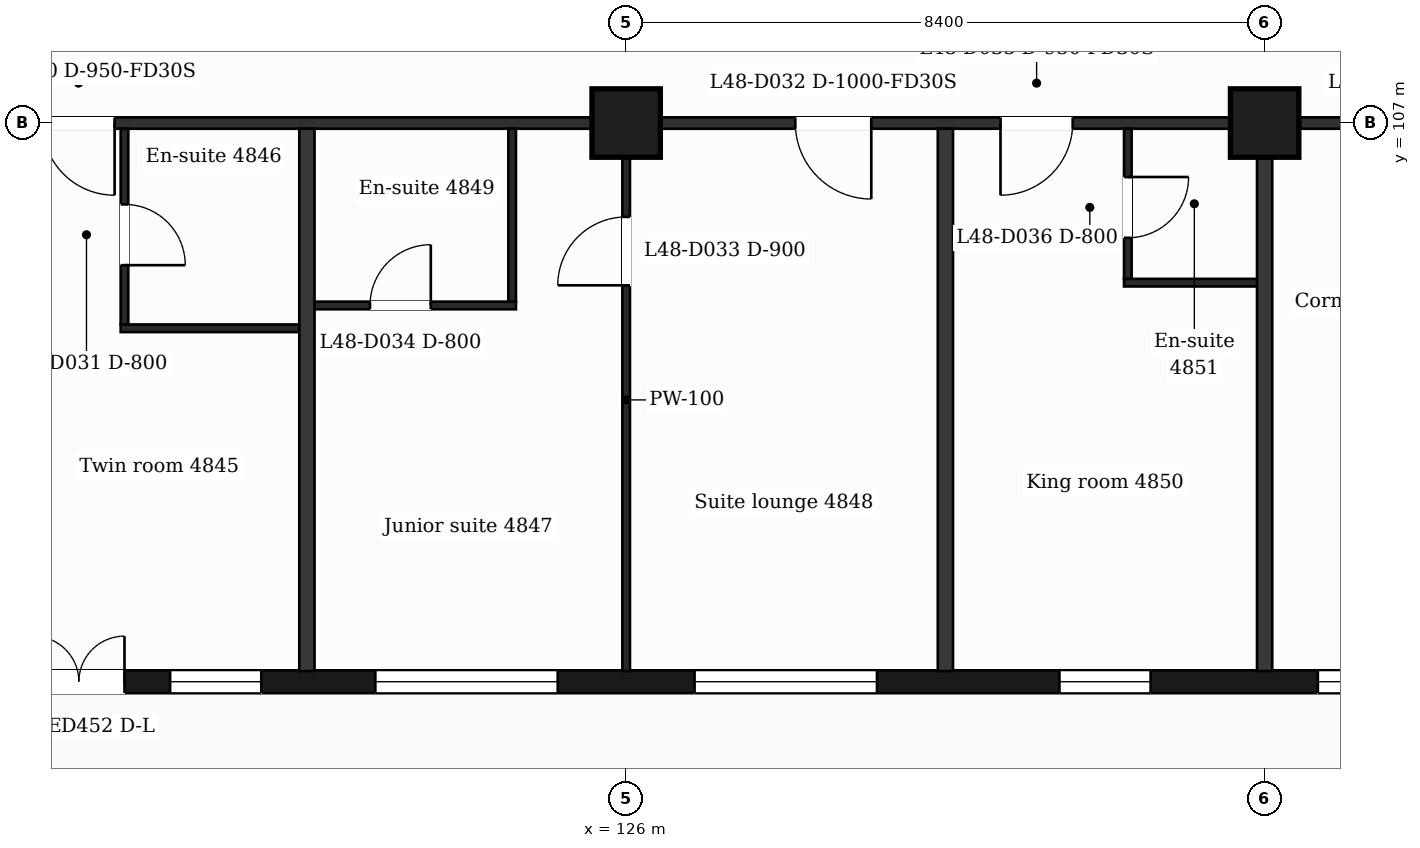
"""IFC4 building model, lengths in metres.
Left out: names, types, materials, properties, quantities, classifications, styles, units other than length and angle.
Written with IfcOpenShell. Run it as: python <this file> out.ifc"""

import sys

from ifc_helpers import new_model, si_unit, direction, frame, frame_2d, origin, origin_2d, place, context, subcontext, project, spatial, rectangle, extrude, element, fill, save


model = new_model("IFC4")
c1 = context("Model", 3, precision=1e-05, world=origin(), true_north=direction((0.0, 1.0)))
c2 = subcontext(c1, "Body", "Model", "MODEL_VIEW")
j1 = project(units=[si_unit("LENGTHUNIT", "METRE"), si_unit("PLANEANGLEUNIT", "RADIAN")], contexts=[c1])
p1 = place(None, origin())
s1 = spatial("IfcSite", under=j1, at=p1, CompositionType="ELEMENT")
p2 = place(p1, origin())
s2 = spatial("IfcBuilding", under=s1, at=p2, CompositionType="ELEMENT")
p3 = place(p2, frame((0.0, 0.0, 202.2)))
s3 = spatial("IfcBuildingStorey", under=s2, at=p3, CompositionType="ELEMENT", Elevation=202.2)
for number, where, z_axis, x_axis in (
    (1, (126.0, 107.0, 0.0), (0.0, 0.0, 1.0), (1.0, 0.0, 0.0)),
    (2, (134.4, 107.0, 0.0), (0.0, 0.0, 1.0), (1.0, 0.0, 0.0)),
):
    element("IfcColumn", number, at=place(p3, frame(where, z_axis=z_axis, x_axis=x_axis)), inside=s3, PredefinedType="COLUMN", context=c2, shape_type="SweptSolid", body=[
        extrude(rectangle(XDim=0.9, YDim=0.9, at=origin_2d()), origin(), (0.0, 0.0, 1.0), 3.7),
    ])
p4 = place(p3, frame((89.85, 99.65, 0.0), z_axis=(0.0, 0.0, 1.0), x_axis=(1.0, 0.0, 0.0)))
e3 = element("IfcWall", 3, at=p4, inside=s3, PredefinedType="SOLIDWALL", context=c2, shape_type="SweptSolid", body=[
    extrude(rectangle(XDim=47.25, YDim=0.3, at=frame_2d((23.625, 0.0))), origin(), (0.0, 0.0, 1.0), 3.38),
])
p5 = place(p4, frame((0.725, 0.0, 0.9)))
e4 = element("IfcOpeningElement", 4, at=p5, cuts=e3, PredefinedType="OPENING", context=c2, shape_type="SweptSolid", body=[
    extrude(rectangle(XDim=1.2, YDim=2.1, at=frame_2d((0.6, 1.05))), frame((0.0, 0.16, 0.0), z_axis=(0.0, -1.0, 0.0), x_axis=(1.0, 0.0, 0.0)), (0.0, 0.0, 1.0), 0.32),
])
p6 = place(p4, frame((3.45, 0.0, 0.9)))
e5 = element("IfcOpeningElement", 5, at=p6, cuts=e3, PredefinedType="OPENING", context=c2, shape_type="SweptSolid", body=[
    extrude(rectangle(XDim=2.4, YDim=2.1, at=frame_2d((1.2, 1.05))), frame((0.0, 0.16, 0.0), z_axis=(0.0, -1.0, 0.0), x_axis=(1.0, 0.0, 0.0)), (0.0, 0.0, 1.0), 0.32),
])
p7 = place(p4, frame((7.65, 0.0, 0.9)))
e6 = element("IfcOpeningElement", 6, at=p7, cuts=e3, PredefinedType="OPENING", context=c2, shape_type="SweptSolid", body=[
    extrude(rectangle(XDim=2.4, YDim=2.1, at=frame_2d((1.2, 1.05))), frame((0.0, 0.16, 0.0), z_axis=(0.0, -1.0, 0.0), x_axis=(1.0, 0.0, 0.0)), (0.0, 0.0, 1.0), 0.32),
])
p8 = place(p4, frame((12.45, 0.0, 0.9)))
e7 = element("IfcOpeningElement", 7, at=p8, cuts=e3, PredefinedType="OPENING", context=c2, shape_type="SweptSolid", body=[
    extrude(rectangle(XDim=1.2, YDim=2.1, at=frame_2d((0.6, 1.05))), frame((0.0, 0.16, 0.0), z_axis=(0.0, -1.0, 0.0), x_axis=(1.0, 0.0, 0.0)), (0.0, 0.0, 1.0), 0.32),
])
p9 = place(p4, frame((16.65, 0.0, 0.9)))
e8 = element("IfcOpeningElement", 8, at=p9, cuts=e3, PredefinedType="OPENING", context=c2, shape_type="SweptSolid", body=[
    extrude(rectangle(XDim=1.2, YDim=2.1, at=frame_2d((0.6, 1.05))), frame((0.0, 0.16, 0.0), z_axis=(0.0, -1.0, 0.0), x_axis=(1.0, 0.0, 0.0)), (0.0, 0.0, 1.0), 0.32),
])
p10 = place(p4, frame((19.95, 0.0, 0.0)))
e9 = element("IfcOpeningElement", 9, at=p10, cuts=e3, PredefinedType="OPENING", context=c2, shape_type="SweptSolid", body=[
    extrude(rectangle(XDim=1.2, YDim=2.4, at=frame_2d((0.6, 1.2))), frame((0.0, 0.16, 0.0), z_axis=(0.0, -1.0, 0.0), x_axis=(1.0, 0.0, 0.0)), (0.0, 0.0, 1.0), 0.32),
])
p11 = place(p4, frame((21.75, 0.0, 0.9)))
e10 = element("IfcOpeningElement", 10, at=p11, cuts=e3, PredefinedType="OPENING", context=c2, shape_type="SweptSolid", body=[
    extrude(rectangle(XDim=1.2, YDim=2.1, at=frame_2d((0.6, 1.05))), frame((0.0, 0.16, 0.0), z_axis=(0.0, -1.0, 0.0), x_axis=(1.0, 0.0, 0.0)), (0.0, 0.0, 1.0), 0.32),
])
p12 = place(p4, frame((24.45, 0.0, 0.9)))
e11 = element("IfcOpeningElement", 11, at=p12, cuts=e3, PredefinedType="OPENING", context=c2, shape_type="SweptSolid", body=[
    extrude(rectangle(XDim=2.4, YDim=2.1, at=frame_2d((1.2, 1.05))), frame((0.0, 0.16, 0.0), z_axis=(0.0, -1.0, 0.0), x_axis=(1.0, 0.0, 0.0)), (0.0, 0.0, 1.0), 0.32),
])
p13 = place(p4, frame((28.35, 0.0, 0.0)))
e12 = element("IfcOpeningElement", 12, at=p13, cuts=e3, PredefinedType="OPENING", context=c2, shape_type="SweptSolid", body=[
    extrude(rectangle(XDim=1.2, YDim=2.4, at=frame_2d((0.6, 1.2))), frame((0.0, 0.16, 0.0), z_axis=(0.0, -1.0, 0.0), x_axis=(1.0, 0.0, 0.0)), (0.0, 0.0, 1.0), 0.32),
])
p14 = place(p4, frame((30.15, 0.0, 0.9)))
e13 = element("IfcOpeningElement", 13, at=p14, cuts=e3, PredefinedType="OPENING", context=c2, shape_type="SweptSolid", body=[
    extrude(rectangle(XDim=1.2, YDim=2.1, at=frame_2d((0.6, 1.05))), frame((0.0, 0.16, 0.0), z_axis=(0.0, -1.0, 0.0), x_axis=(1.0, 0.0, 0.0)), (0.0, 0.0, 1.0), 0.32),
])
p15 = place(p4, frame((32.85, 0.0, 0.9)))
e14 = element("IfcOpeningElement", 14, at=p15, cuts=e3, PredefinedType="OPENING", context=c2, shape_type="SweptSolid", body=[
    extrude(rectangle(XDim=2.4, YDim=2.1, at=frame_2d((1.2, 1.05))), frame((0.0, 0.16, 0.0), z_axis=(0.0, -1.0, 0.0), x_axis=(1.0, 0.0, 0.0)), (0.0, 0.0, 1.0), 0.32),
])
p16 = place(p4, frame((37.05, 0.0, 0.9)))
e15 = element("IfcOpeningElement", 15, at=p16, cuts=e3, PredefinedType="OPENING", context=c2, shape_type="SweptSolid", body=[
    extrude(rectangle(XDim=2.4, YDim=2.1, at=frame_2d((1.2, 1.05))), frame((0.0, 0.16, 0.0), z_axis=(0.0, -1.0, 0.0), x_axis=(1.0, 0.0, 0.0)), (0.0, 0.0, 1.0), 0.32),
])
p17 = place(p4, frame((41.85, 0.0, 0.9)))
e16 = element("IfcOpeningElement", 16, at=p17, cuts=e3, PredefinedType="OPENING", context=c2, shape_type="SweptSolid", body=[
    extrude(rectangle(XDim=1.2, YDim=2.1, at=frame_2d((0.6, 1.05))), frame((0.0, 0.16, 0.0), z_axis=(0.0, -1.0, 0.0), x_axis=(1.0, 0.0, 0.0)), (0.0, 0.0, 1.0), 0.32),
])
p18 = place(p4, frame((45.25, 0.0, 0.9)))
e17 = element("IfcOpeningElement", 17, at=p18, cuts=e3, PredefinedType="OPENING", context=c2, shape_type="SweptSolid", body=[
    extrude(rectangle(XDim=1.2, YDim=2.1, at=frame_2d((0.6, 1.05))), frame((0.0, 0.16, 0.0), z_axis=(0.0, -1.0, 0.0), x_axis=(1.0, 0.0, 0.0)), (0.0, 0.0, 1.0), 0.32),
])
p19 = place(p3, frame((119.35, 104.3, 0.0), z_axis=(0.0, 0.0, 1.0), x_axis=(1.0, 0.0, 0.0)))
e18 = element("IfcWall", 18, at=p19, inside=s3, PredefinedType="PARTITIONING", context=c2, shape_type="SweptSolid", body=[
    extrude(rectangle(XDim=2.45, YDim=0.1, at=frame_2d((1.225, 0.0))), origin(), (0.0, 0.0, 1.0), 3.38),
])
p20 = place(p3, frame((121.8, 104.6, 0.0), z_axis=(0.0, 0.0, 1.0), x_axis=(1.0, 0.0, 0.0)))
e19 = element("IfcWall", 19, at=p20, inside=s3, PredefinedType="PARTITIONING", context=c2, shape_type="SweptSolid", body=[
    extrude(rectangle(XDim=2.75, YDim=0.1, at=frame_2d((1.375, 0.0))), origin(), (0.0, 0.0, 1.0), 3.38),
])
p21 = place(p20, frame((0.83, 0.0, 0.0)))
e20 = element("IfcOpeningElement", 20, at=p21, cuts=e19, PredefinedType="OPENING", context=c2, shape_type="SweptSolid", body=[
    extrude(rectangle(XDim=0.8, YDim=2.1, at=frame_2d((0.4, 1.05))), frame((0.0, 0.06, 0.0), z_axis=(0.0, -1.0, 0.0), x_axis=(1.0, 0.0, 0.0)), (0.0, 0.0, 1.0), 0.12),
])
p22 = place(p3, frame((132.55, 104.9, 0.0), z_axis=(0.0, 0.0, 1.0), x_axis=(1.0, 0.0, 0.0)))
e21 = element("IfcWall", 21, at=p22, inside=s3, PredefinedType="PARTITIONING", context=c2, shape_type="SweptSolid", body=[
    extrude(rectangle(XDim=1.85, YDim=0.1, at=frame_2d((0.925, 0.0))), origin(), (0.0, 0.0, 1.0), 3.38),
])
p23 = place(p3, frame((87.018, 107.0, 0.0), z_axis=(0.0, 0.0, 1.0), x_axis=(1.0, 0.0, 0.0)))
e22 = element("IfcWall", 22, at=p23, inside=s3, PredefinedType="PARTITIONING", context=c2, shape_type="SweptSolid", body=[
    extrude(rectangle(XDim=52.765, YDim=0.15, at=frame_2d((26.382, 0.0))), origin(), (0.0, 0.0, 1.0), 3.38),
])
p24 = place(p23, frame((1.276, 0.0, 0.0)))
e23 = element("IfcOpeningElement", 23, at=p24, cuts=e22, PredefinedType="OPENING", context=c2, shape_type="SweptSolid", body=[
    extrude(rectangle(XDim=0.95, YDim=2.1, at=frame_2d((0.475, 1.05))), frame((0.0, 0.085, 0.0), z_axis=(0.0, -1.0, 0.0), x_axis=(1.0, 0.0, 0.0)), (0.0, 0.0, 1.0), 0.17),
])
p25 = place(p23, frame((6.369, 0.0, 0.0)))
e24 = element("IfcOpeningElement", 24, at=p25, cuts=e22, PredefinedType="OPENING", context=c2, shape_type="SweptSolid", body=[
    extrude(rectangle(XDim=0.95, YDim=2.1, at=frame_2d((0.475, 1.05))), frame((0.0, 0.085, 0.0), z_axis=(0.0, -1.0, 0.0), x_axis=(1.0, 0.0, 0.0)), (0.0, 0.0, 1.0), 0.17),
])
p26 = place(p23, frame((12.112, 0.0, 0.0)))
e25 = element("IfcOpeningElement", 25, at=p26, cuts=e22, PredefinedType="OPENING", context=c2, shape_type="SweptSolid", body=[
    extrude(rectangle(XDim=0.95, YDim=2.1, at=frame_2d((0.475, 1.05))), frame((0.0, 0.085, 0.0), z_axis=(0.0, -1.0, 0.0), x_axis=(1.0, 0.0, 0.0)), (0.0, 0.0, 1.0), 0.17),
])
p27 = place(p23, frame((14.582, 0.0, 0.0)))
e26 = element("IfcOpeningElement", 26, at=p27, cuts=e22, PredefinedType="OPENING", context=c2, shape_type="SweptSolid", body=[
    extrude(rectangle(XDim=0.95, YDim=2.1, at=frame_2d((0.475, 1.05))), frame((0.0, 0.085, 0.0), z_axis=(0.0, -1.0, 0.0), x_axis=(1.0, 0.0, 0.0)), (0.0, 0.0, 1.0), 0.17),
])
p28 = place(p23, frame((20.512, 0.0, 0.0)))
e27 = element("IfcOpeningElement", 27, at=p28, cuts=e22, PredefinedType="OPENING", context=c2, shape_type="SweptSolid", body=[
    extrude(rectangle(XDim=0.95, YDim=2.1, at=frame_2d((0.475, 1.05))), frame((0.0, 0.085, 0.0), z_axis=(0.0, -1.0, 0.0), x_axis=(1.0, 0.0, 0.0)), (0.0, 0.0, 1.0), 0.17),
])
p29 = place(p23, frame((25.157, 0.0, 0.0)))
e28 = element("IfcOpeningElement", 28, at=p29, cuts=e22, PredefinedType="OPENING", context=c2, shape_type="SweptSolid", body=[
    extrude(rectangle(XDim=0.95, YDim=2.1, at=frame_2d((0.475, 1.05))), frame((0.0, 0.085, 0.0), z_axis=(0.0, -1.0, 0.0), x_axis=(1.0, 0.0, 0.0)), (0.0, 0.0, 1.0), 0.17),
])
p30 = place(p23, frame((26.657, 0.0, 0.0)))
e29 = element("IfcOpeningElement", 29, at=p30, cuts=e22, PredefinedType="OPENING", context=c2, shape_type="SweptSolid", body=[
    extrude(rectangle(XDim=0.95, YDim=2.1, at=frame_2d((0.475, 1.05))), frame((0.0, 0.085, 0.0), z_axis=(0.0, -1.0, 0.0), x_axis=(1.0, 0.0, 0.0)), (0.0, 0.0, 1.0), 0.17),
])
p31 = place(p23, frame((31.302, 0.0, 0.0)))
e30 = element("IfcOpeningElement", 30, at=p31, cuts=e22, PredefinedType="OPENING", context=c2, shape_type="SweptSolid", body=[
    extrude(rectangle(XDim=0.95, YDim=2.1, at=frame_2d((0.475, 1.05))), frame((0.0, 0.085, 0.0), z_axis=(0.0, -1.0, 0.0), x_axis=(1.0, 0.0, 0.0)), (0.0, 0.0, 1.0), 0.17),
])
p32 = place(p23, frame((41.207, 0.0, 0.0)))
e31 = element("IfcOpeningElement", 31, at=p32, cuts=e22, PredefinedType="OPENING", context=c2, shape_type="SweptSolid", body=[
    extrude(rectangle(XDim=1.0, YDim=2.1, at=frame_2d((0.5, 1.05))), frame((0.0, 0.085, 0.0), z_axis=(0.0, -1.0, 0.0), x_axis=(1.0, 0.0, 0.0)), (0.0, 0.0, 1.0), 0.17),
])
p33 = place(p23, frame((43.907, 0.0, 0.0)))
e32 = element("IfcOpeningElement", 32, at=p33, cuts=e22, PredefinedType="OPENING", context=c2, shape_type="SweptSolid", body=[
    extrude(rectangle(XDim=0.95, YDim=2.1, at=frame_2d((0.475, 1.05))), frame((0.0, 0.085, 0.0), z_axis=(0.0, -1.0, 0.0), x_axis=(1.0, 0.0, 0.0)), (0.0, 0.0, 1.0), 0.17),
])
p34 = place(p23, frame((49.285, 0.0, 0.0)))
e33 = element("IfcOpeningElement", 33, at=p34, cuts=e22, PredefinedType="OPENING", context=c2, shape_type="SweptSolid", body=[
    extrude(rectangle(XDim=0.95, YDim=2.1, at=frame_2d((0.475, 1.05))), frame((0.0, 0.085, 0.0), z_axis=(0.0, -1.0, 0.0), x_axis=(1.0, 0.0, 0.0)), (0.0, 0.0, 1.0), 0.17),
])
p35 = place(p3, frame((119.4, 104.35, 0.0), z_axis=(0.0, 0.0, 1.0), x_axis=(0.0, 1.0, 0.0)))
e34 = element("IfcWall", 34, at=p35, inside=s3, PredefinedType="PARTITIONING", context=c2, shape_type="SweptSolid", body=[
    extrude(rectangle(XDim=2.575, YDim=0.1, at=frame_2d((1.288, 0.0))), origin(), (0.0, 0.0, 1.0), 3.38),
])
p36 = place(p35, frame((0.78, 0.0, 0.0)))
e35 = element("IfcOpeningElement", 35, at=p36, cuts=e34, PredefinedType="OPENING", context=c2, shape_type="SweptSolid", body=[
    extrude(rectangle(XDim=0.8, YDim=2.1, at=frame_2d((0.4, 1.05))), frame((0.0, 0.06, 0.0), z_axis=(0.0, -1.0, 0.0), x_axis=(1.0, 0.0, 0.0)), (0.0, 0.0, 1.0), 0.12),
])
p37 = place(p3, frame((121.8, 99.79, 0.0), z_axis=(0.0, 0.0, 1.0), x_axis=(0.0, 1.0, 0.0)))
e36 = element("IfcWall", 36, at=p37, inside=s3, PredefinedType="PARTITIONING", context=c2, shape_type="SweptSolid", body=[
    extrude(rectangle(XDim=7.135, YDim=0.2, at=frame_2d((3.567, 0.0))), origin(), (0.0, 0.0, 1.0), 3.38),
])
p38 = place(p3, frame((124.5, 104.65, 0.0), z_axis=(0.0, 0.0, 1.0), x_axis=(0.0, 1.0, 0.0)))
e37 = element("IfcWall", 37, at=p38, inside=s3, PredefinedType="PARTITIONING", context=c2, shape_type="SweptSolid", body=[
    extrude(rectangle(XDim=2.275, YDim=0.1, at=frame_2d((1.138, 0.0))), origin(), (0.0, 0.0, 1.0), 3.38),
])
p39 = place(p3, frame((126.0, 99.79, 0.0), z_axis=(0.0, 0.0, 1.0), x_axis=(0.0, 1.0, 0.0)))
e38 = element("IfcWall", 38, at=p39, inside=s3, PredefinedType="PARTITIONING", context=c2, shape_type="SweptSolid", body=[
    extrude(rectangle(XDim=7.135, YDim=0.1, at=frame_2d((3.567, 0.0))), origin(), (0.0, 0.0, 1.0), 3.38),
])
p40 = place(p39, frame((5.075, 0.0, 0.0)))
e39 = element("IfcOpeningElement", 39, at=p40, cuts=e38, PredefinedType="OPENING", context=c2, shape_type="SweptSolid", body=[
    extrude(rectangle(XDim=0.9, YDim=2.1, at=frame_2d((0.45, 1.05))), frame((0.0, 0.06, 0.0), z_axis=(0.0, -1.0, 0.0), x_axis=(1.0, 0.0, 0.0)), (0.0, 0.0, 1.0), 0.12),
])
p41 = place(p3, frame((130.2, 99.79, 0.0), z_axis=(0.0, 0.0, 1.0), x_axis=(0.0, 1.0, 0.0)))
e40 = element("IfcWall", 40, at=p41, inside=s3, PredefinedType="PARTITIONING", context=c2, shape_type="SweptSolid", body=[
    extrude(rectangle(XDim=7.135, YDim=0.2, at=frame_2d((3.567, 0.0))), origin(), (0.0, 0.0, 1.0), 3.38),
])
p42 = place(p3, frame((132.6, 104.95, 0.0), z_axis=(0.0, 0.0, 1.0), x_axis=(0.0, 1.0, 0.0)))
e41 = element("IfcWall", 41, at=p42, inside=s3, PredefinedType="PARTITIONING", context=c2, shape_type="SweptSolid", body=[
    extrude(rectangle(XDim=1.975, YDim=0.1, at=frame_2d((0.988, 0.0))), origin(), (0.0, 0.0, 1.0), 3.38),
])
p43 = place(p42, frame((0.54, 0.0, 0.0)))
e42 = element("IfcOpeningElement", 42, at=p43, cuts=e41, PredefinedType="OPENING", context=c2, shape_type="SweptSolid", body=[
    extrude(rectangle(XDim=0.8, YDim=2.1, at=frame_2d((0.4, 1.05))), frame((0.0, 0.06, 0.0), z_axis=(0.0, -1.0, 0.0), x_axis=(1.0, 0.0, 0.0)), (0.0, 0.0, 1.0), 0.12),
])
p44 = place(p3, frame((134.4, 99.79, 0.0), z_axis=(0.0, 0.0, 1.0), x_axis=(0.0, 1.0, 0.0)))
e43 = element("IfcWall", 43, at=p44, inside=s3, PredefinedType="PARTITIONING", context=c2, shape_type="SweptSolid", body=[
    extrude(rectangle(XDim=7.135, YDim=0.2, at=frame_2d((3.567, 0.0))), origin(), (0.0, 0.0, 1.0), 3.38),
])
p45 = place(p13, origin())
e44 = element("IfcDoor", 44, at=p45, inside=s3, OperationType="DOUBLE_DOOR_SINGLE_SWING", PredefinedType="DOOR", context=c2, shape_type="SweptSolid", body=[
    extrude(rectangle(XDim=1.2, YDim=2.4, at=frame_2d((0.6, 1.2))), frame((0.0, 0.025, 0.0), z_axis=(0.0, -1.0, 0.0), x_axis=(1.0, 0.0, 0.0)), (0.0, 0.0, 1.0), 0.05),
])
fill(e12, e44)
p46 = place(p14, origin())
e45 = element("IfcWindow", 45, at=p46, inside=s3, PartitioningType="SINGLE_PANEL", PredefinedType="WINDOW", context=c2, shape_type="SweptSolid", body=[
    extrude(rectangle(XDim=1.2, YDim=2.1, at=frame_2d((0.6, 1.05))), frame((0.0, 0.03, 0.0), z_axis=(0.0, -1.0, 0.0), x_axis=(1.0, 0.0, 0.0)), (0.0, 0.0, 1.0), 0.06),
])
fill(e13, e45)
p47 = place(p15, origin())
e46 = element("IfcWindow", 46, at=p47, inside=s3, PartitioningType="SINGLE_PANEL", PredefinedType="WINDOW", context=c2, shape_type="SweptSolid", body=[
    extrude(rectangle(XDim=2.4, YDim=2.1, at=frame_2d((1.2, 1.05))), frame((0.0, 0.03, 0.0), z_axis=(0.0, -1.0, 0.0), x_axis=(1.0, 0.0, 0.0)), (0.0, 0.0, 1.0), 0.06),
])
fill(e14, e46)
p48 = place(p16, origin())
e47 = element("IfcWindow", 47, at=p48, inside=s3, PartitioningType="SINGLE_PANEL", PredefinedType="WINDOW", context=c2, shape_type="SweptSolid", body=[
    extrude(rectangle(XDim=2.4, YDim=2.1, at=frame_2d((1.2, 1.05))), frame((0.0, 0.03, 0.0), z_axis=(0.0, -1.0, 0.0), x_axis=(1.0, 0.0, 0.0)), (0.0, 0.0, 1.0), 0.06),
])
fill(e15, e47)
p49 = place(p17, origin())
e48 = element("IfcWindow", 48, at=p49, inside=s3, PartitioningType="SINGLE_PANEL", PredefinedType="WINDOW", context=c2, shape_type="SweptSolid", body=[
    extrude(rectangle(XDim=1.2, YDim=2.1, at=frame_2d((0.6, 1.05))), frame((0.0, 0.03, 0.0), z_axis=(0.0, -1.0, 0.0), x_axis=(1.0, 0.0, 0.0)), (0.0, 0.0, 1.0), 0.06),
])
fill(e16, e48)
p50 = place(p18, origin())
e49 = element("IfcWindow", 49, at=p50, inside=s3, PartitioningType="SINGLE_PANEL", PredefinedType="WINDOW", context=c2, shape_type="SweptSolid", body=[
    extrude(rectangle(XDim=1.2, YDim=2.1, at=frame_2d((0.6, 1.05))), frame((0.0, 0.03, 0.0), z_axis=(0.0, -1.0, 0.0), x_axis=(1.0, 0.0, 0.0)), (0.0, 0.0, 1.0), 0.06),
])
fill(e17, e49)
p51 = place(p31, origin())
e50 = element("IfcDoor", 50, at=p51, inside=s3, OperationType="SINGLE_SWING_RIGHT", PredefinedType="DOOR", context=c2, shape_type="SweptSolid", body=[
    extrude(rectangle(XDim=0.95, YDim=2.1, at=frame_2d((0.475, 1.05))), frame((0.0, 0.025, 0.0), z_axis=(0.0, -1.0, 0.0), x_axis=(1.0, 0.0, 0.0)), (0.0, 0.0, 1.0), 0.05),
])
fill(e30, e50)
p52 = place(p36, origin())
e51 = element("IfcDoor", 51, at=p52, inside=s3, OperationType="SINGLE_SWING_LEFT", PredefinedType="DOOR", context=c2, shape_type="SweptSolid", body=[
    extrude(rectangle(XDim=0.8, YDim=2.1, at=frame_2d((0.4, 1.05))), frame((0.0, 0.025, 0.0), z_axis=(0.0, -1.0, 0.0), x_axis=(1.0, 0.0, 0.0)), (0.0, 0.0, 1.0), 0.05),
])
fill(e35, e51)
p53 = place(p32, origin())
e52 = element("IfcDoor", 52, at=p53, inside=s3, OperationType="SINGLE_SWING_RIGHT", PredefinedType="DOOR", context=c2, shape_type="SweptSolid", body=[
    extrude(rectangle(XDim=1.0, YDim=2.1, at=frame_2d((0.5, 1.05))), frame((0.0, 0.025, 0.0), z_axis=(0.0, -1.0, 0.0), x_axis=(1.0, 0.0, 0.0)), (0.0, 0.0, 1.0), 0.05),
])
fill(e31, e52)
p54 = place(p40, origin())
e53 = element("IfcDoor", 53, at=p54, inside=s3, OperationType="SINGLE_SWING_LEFT", PredefinedType="DOOR", context=c2, shape_type="SweptSolid", body=[
    extrude(rectangle(XDim=0.9, YDim=2.1, at=frame_2d((0.45, 1.05))), frame((0.0, 0.025, 0.0), z_axis=(0.0, -1.0, 0.0), x_axis=(1.0, 0.0, 0.0)), (0.0, 0.0, 1.0), 0.05),
])
fill(e39, e53)
p55 = place(p21, origin())
e54 = element("IfcDoor", 54, at=p55, inside=s3, OperationType="SINGLE_SWING_RIGHT", PredefinedType="DOOR", context=c2, shape_type="SweptSolid", body=[
    extrude(rectangle(XDim=0.8, YDim=2.1, at=frame_2d((0.4, 1.05))), frame((0.0, 0.025, 0.0), z_axis=(0.0, -1.0, 0.0), x_axis=(1.0, 0.0, 0.0)), (0.0, 0.0, 1.0), 0.05),
])
fill(e20, e54)
p56 = place(p33, origin())
e55 = element("IfcDoor", 55, at=p56, inside=s3, OperationType="SINGLE_SWING_LEFT", PredefinedType="DOOR", context=c2, shape_type="SweptSolid", body=[
    extrude(rectangle(XDim=0.95, YDim=2.1, at=frame_2d((0.475, 1.05))), frame((0.0, 0.025, 0.0), z_axis=(0.0, -1.0, 0.0), x_axis=(1.0, 0.0, 0.0)), (0.0, 0.0, 1.0), 0.05),
])
fill(e32, e55)
p57 = place(p43, origin())
e56 = element("IfcDoor", 56, at=p57, inside=s3, OperationType="SINGLE_SWING_RIGHT", PredefinedType="DOOR", context=c2, shape_type="SweptSolid", body=[
    extrude(rectangle(XDim=0.8, YDim=2.1, at=frame_2d((0.4, 1.05))), frame((0.0, 0.025, 0.0), z_axis=(0.0, -1.0, 0.0), x_axis=(1.0, 0.0, 0.0)), (0.0, 0.0, 1.0), 0.05),
])
fill(e42, e56)
save(model, sys.argv[1])
